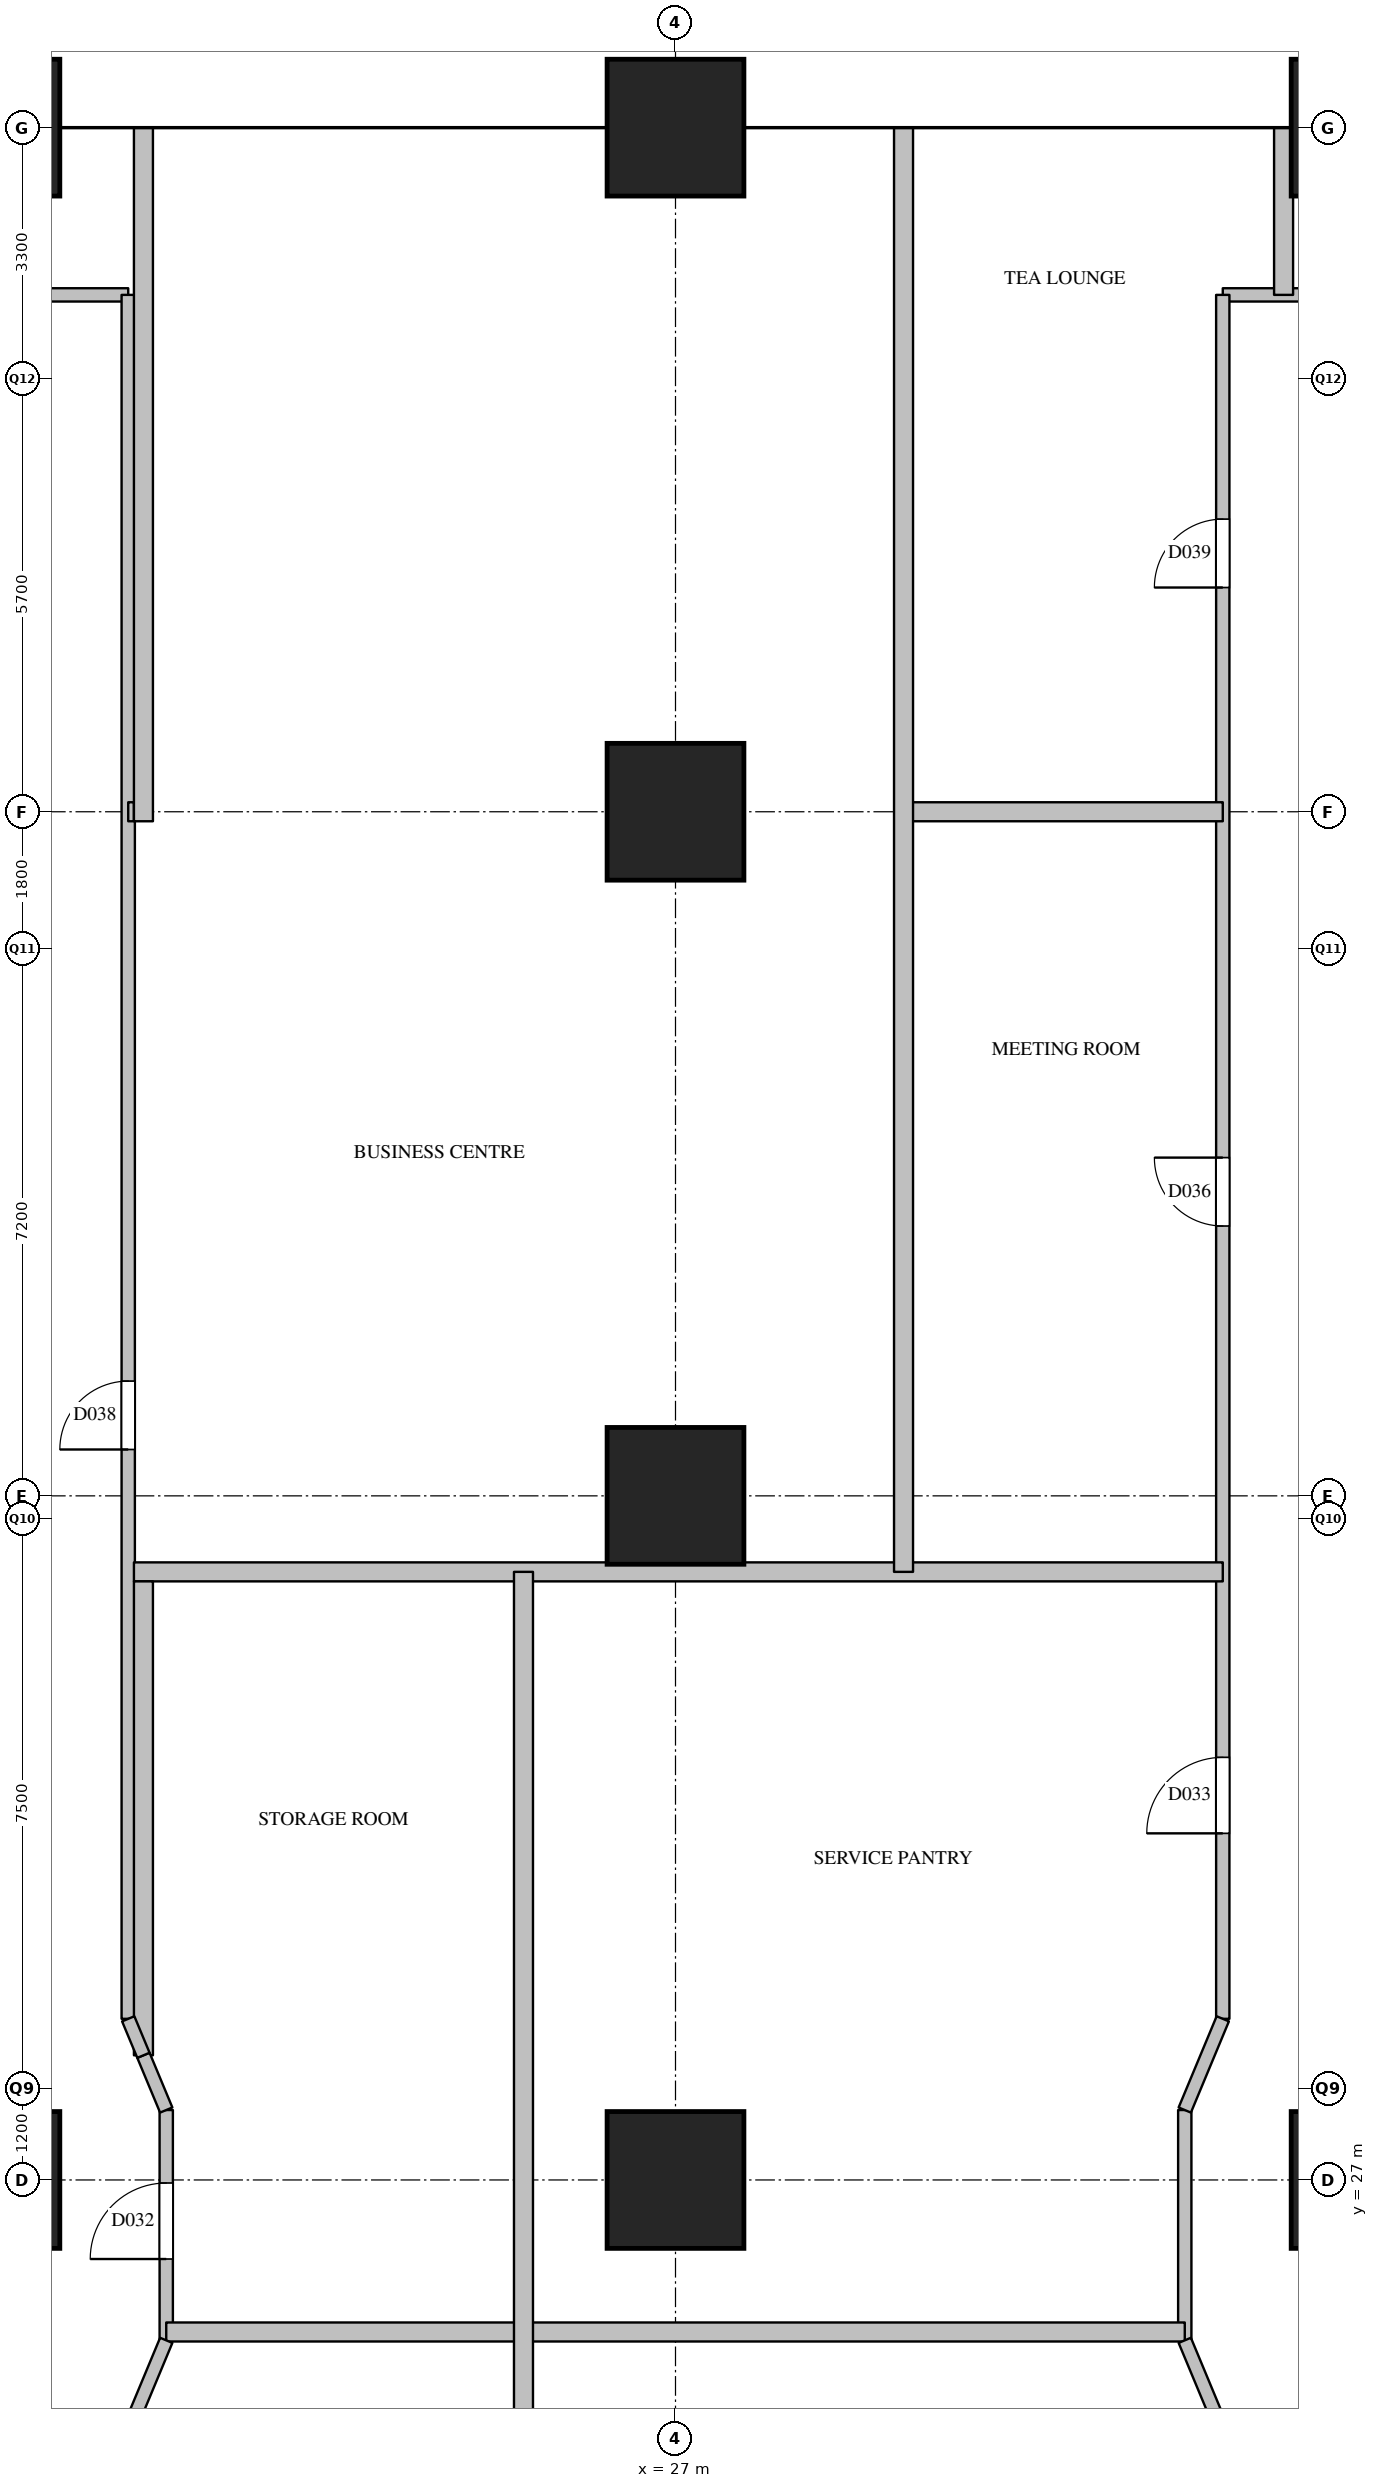
"""IFC4 building model, lengths in metres.
Left out: names, types, materials, properties, quantities, classifications, styles, units other than length and angle.
Written with IfcOpenShell. Run it as: python <this file> out.ifc"""

import sys

from ifc_helpers import new_model, si_unit, direction, frame, frame_2d, origin, origin_2d, place, context, subcontext, project, spatial, rectangle, extrude, element, fill, save


model = new_model("IFC4")
c1 = context("Model", 3, precision=1e-05, world=origin(), true_north=direction((0.0, 1.0)))
c2 = subcontext(c1, "Body", "Model", "MODEL_VIEW")
j1 = project(units=[si_unit("LENGTHUNIT", "METRE"), si_unit("PLANEANGLEUNIT", "RADIAN")], contexts=[c1])
p1 = place(None, origin())
s1 = spatial("IfcSite", under=j1, at=p1, CompositionType="ELEMENT")
p2 = place(p1, origin())
s2 = spatial("IfcBuilding", under=s1, at=p2, CompositionType="ELEMENT")
p3 = place(p2, frame((0.0, 0.0, 72.8)))
s3 = spatial("IfcBuildingStorey", under=s2, at=p3, CompositionType="ELEMENT", Elevation=72.8)
for number, where, z_axis, x_axis in (
    (1, (18.0, 27.0, 0.0), (0.0, 0.0, 1.0), (1.0, 0.0, 0.0)),
    (2, (18.0, 54.0, 0.0), (0.0, 0.0, 1.0), (1.0, 0.0, 0.0)),
    (3, (27.0, 27.0, 0.0), (0.0, 0.0, 1.0), (1.0, 0.0, 0.0)),
    (4, (27.0, 36.0, 0.0), (0.0, 0.0, 1.0), (1.0, 0.0, 0.0)),
    (5, (27.0, 45.0, 0.0), (0.0, 0.0, 1.0), (1.0, 0.0, 0.0)),
    (6, (27.0, 54.0, 0.0), (0.0, 0.0, 1.0), (1.0, 0.0, 0.0)),
    (7, (36.0, 27.0, 0.0), (0.0, 0.0, 1.0), (1.0, 0.0, 0.0)),
    (8, (36.0, 54.0, 0.0), (0.0, 0.0, 1.0), (1.0, 0.0, 0.0)),
):
    element("IfcColumn", number, at=place(p3, frame(where, z_axis=z_axis, x_axis=x_axis)), inside=s3, PredefinedType="COLUMN", context=c2, shape_type="SweptSolid", body=[
        extrude(rectangle(XDim=1.8, YDim=1.8, at=origin_2d()), origin(), (0.0, 0.0, 1.0), 5.0),
    ])
p4 = place(p3, frame((3.8, 51.8, 0.0), z_axis=(0.0, 0.0, 1.0), x_axis=(1.0, 0.0, 0.0)))
e9 = element("IfcWall", 9, at=p4, inside=s3, PredefinedType="PARTITIONING", context=c2, shape_type="SweptSolid", body=[
    extrude(rectangle(XDim=16.0, YDim=0.175, at=frame_2d((8.0, 0.0))), origin(), (0.0, 0.0, 1.0), 4.7),
])
p5 = place(p4, frame((10.65, 0.0, 0.0)))
e10 = element("IfcOpeningElement", 10, at=p5, cuts=e9, PredefinedType="OPENING", context=c2, shape_type="SweptSolid", body=[
    extrude(rectangle(XDim=0.9, YDim=2.1, at=frame_2d((0.45, 1.05))), frame((0.0, 0.097, 0.0), z_axis=(0.0, -1.0, 0.0), x_axis=(1.0, 0.0, 0.0)), (0.0, 0.0, 1.0), 0.195),
])
p6 = place(p3, frame((34.2, 51.8, 0.0), z_axis=(0.0, 0.0, 1.0), x_axis=(1.0, 0.0, 0.0)))
e11 = element("IfcWall", 11, at=p6, inside=s3, PredefinedType="PARTITIONING", context=c2, shape_type="SweptSolid", body=[
    extrude(rectangle(XDim=16.0, YDim=0.175, at=frame_2d((8.0, 0.0))), origin(), (0.0, 0.0, 1.0), 4.7),
])
p7 = place(p6, frame((5.35, 0.0, 0.0)))
e12 = element("IfcOpeningElement", 12, at=p7, cuts=e11, PredefinedType="OPENING", context=c2, shape_type="SweptSolid", body=[
    extrude(rectangle(XDim=0.9, YDim=2.1, at=frame_2d((0.45, 1.05))), frame((0.0, 0.097, 0.0), z_axis=(0.0, -1.0, 0.0), x_axis=(1.0, 0.0, 0.0)), (0.0, 0.0, 1.0), 0.195),
])
p8 = place(p3, frame((19.8, 29.12, 0.0), z_axis=(0.0, 0.0, 1.0), x_axis=(0.0, 1.0, 0.0)))
e13 = element("IfcWall", 13, at=p8, inside=s3, PredefinedType="PARTITIONING", context=c2, shape_type="SweptSolid", body=[
    extrude(rectangle(XDim=22.68, YDim=0.175, at=frame_2d((11.34, 0.0))), origin(), (0.0, 0.0, 1.0), 4.7),
])
p9 = place(p8, frame((7.49, 0.0, 0.0)))
e14 = element("IfcOpeningElement", 14, at=p9, cuts=e13, PredefinedType="OPENING", context=c2, shape_type="SweptSolid", body=[
    extrude(rectangle(XDim=0.9, YDim=2.1, at=frame_2d((0.45, 1.05))), frame((0.0, 0.097, 0.0), z_axis=(0.0, -1.0, 0.0), x_axis=(1.0, 0.0, 0.0)), (0.0, 0.0, 1.0), 0.195),
])
p10 = place(p3, frame((20.3, 24.89, 0.0), z_axis=(0.0, 0.0, 1.0), x_axis=(0.0, 1.0, 0.0)))
e15 = element("IfcWall", 15, at=p10, inside=s3, PredefinedType="PARTITIONING", context=c2, shape_type="SweptSolid", body=[
    extrude(rectangle(XDim=3.03, YDim=0.175, at=frame_2d((1.515, 0.0))), origin(), (0.0, 0.0, 1.0), 3.59),
])
p11 = place(p10, frame((1.07, 0.0, 0.0)))
e16 = element("IfcOpeningElement", 16, at=p11, cuts=e15, PredefinedType="OPENING", context=c2, shape_type="SweptSolid", body=[
    extrude(rectangle(XDim=1.0, YDim=2.1, at=frame_2d((0.5, 1.05))), frame((0.0, 0.097, 0.0), z_axis=(0.0, -1.0, 0.0), x_axis=(1.0, 0.0, 0.0)), (0.0, 0.0, 1.0), 0.195),
])
p12 = place(p3, frame((33.7, 24.89, 0.0), z_axis=(0.0, 0.0, 1.0), x_axis=(0.0, 1.0, 0.0)))
e17 = element("IfcWall", 17, at=p12, inside=s3, PredefinedType="PARTITIONING", context=c2, shape_type="SweptSolid", body=[
    extrude(rectangle(XDim=3.03, YDim=0.175, at=frame_2d((1.515, 0.0))), origin(), (0.0, 0.0, 1.0), 3.7),
])
p13 = place(p3, frame((34.2, 29.12, 0.0), z_axis=(0.0, 0.0, 1.0), x_axis=(0.0, 1.0, 0.0)))
e18 = element("IfcWall", 18, at=p13, inside=s3, PredefinedType="PARTITIONING", context=c2, shape_type="SweptSolid", body=[
    extrude(rectangle(XDim=22.68, YDim=0.175, at=frame_2d((11.34, 0.0))), origin(), (0.0, 0.0, 1.0), 4.7),
])
p14 = place(p13, frame((2.44, 0.0, 0.0)))
e19 = element("IfcOpeningElement", 19, at=p14, cuts=e18, PredefinedType="OPENING", context=c2, shape_type="SweptSolid", body=[
    extrude(rectangle(XDim=1.0, YDim=2.1, at=frame_2d((0.5, 1.05))), frame((0.0, 0.097, 0.0), z_axis=(0.0, -1.0, 0.0), x_axis=(1.0, 0.0, 0.0)), (0.0, 0.0, 1.0), 0.195),
])
p15 = place(p13, frame((10.43, 0.0, 0.0)))
e20 = element("IfcOpeningElement", 20, at=p15, cuts=e18, PredefinedType="OPENING", context=c2, shape_type="SweptSolid", body=[
    extrude(rectangle(XDim=0.9, YDim=2.1, at=frame_2d((0.45, 1.05))), frame((0.0, 0.097, 0.0), z_axis=(0.0, -1.0, 0.0), x_axis=(1.0, 0.0, 0.0)), (0.0, 0.0, 1.0), 0.195),
])
p16 = place(p13, frame((18.83, 0.0, 0.0)))
e21 = element("IfcOpeningElement", 21, at=p16, cuts=e18, PredefinedType="OPENING", context=c2, shape_type="SweptSolid", body=[
    extrude(rectangle(XDim=0.9, YDim=2.1, at=frame_2d((0.45, 1.05))), frame((0.0, 0.097, 0.0), z_axis=(0.0, -1.0, 0.0), x_axis=(1.0, 0.0, 0.0)), (0.0, 0.0, 1.0), 0.195),
])
p17 = place(p3, frame((20.3, 25.0, 0.0), z_axis=(0.0, 0.0, 1.0), x_axis=(1.0, 0.0, 0.0)))
e22 = element("IfcWall", 22, at=p17, inside=s3, PredefinedType="PARTITIONING", context=c2, shape_type="SweptSolid", body=[
    extrude(rectangle(XDim=13.4, YDim=0.25, at=frame_2d((6.7, 0.0))), origin(), (0.0, 0.0, 1.0), 3.59),
])
p18 = place(p3, frame((19.875, 35.0, 0.0), z_axis=(0.0, 0.0, 1.0), x_axis=(1.0, 0.0, 0.0)))
e23 = element("IfcWall", 23, at=p18, inside=s3, PredefinedType="PARTITIONING", context=c2, shape_type="SweptSolid", body=[
    extrude(rectangle(XDim=14.325, YDim=0.25, at=frame_2d((7.163, 0.0))), origin(), (0.0, 0.0, 1.0), 3.7),
])
p19 = place(p3, frame((19.8, 45.0, 0.0), z_axis=(0.0, 0.0, 1.0), x_axis=(1.0, 0.0, 0.0)))
e24 = element("IfcWall", 24, at=p19, inside=s3, PredefinedType="PARTITIONING", context=c2, shape_type="SweptSolid", body=[
    extrude(rectangle(XDim=0.075, YDim=0.25, at=frame_2d((0.038, 0.0))), origin(), (0.0, 0.0, 1.0), 4.7),
])
p20 = place(p3, frame((30.0, 45.0, 0.0), z_axis=(0.0, 0.0, 1.0), x_axis=(1.0, 0.0, 0.0)))
e25 = element("IfcWall", 25, at=p20, inside=s3, PredefinedType="PARTITIONING", context=c2, shape_type="SweptSolid", body=[
    extrude(rectangle(XDim=4.2, YDim=0.25, at=frame_2d((2.1, 0.0))), origin(), (0.0, 0.0, 1.0), 4.7),
])
p21 = place(p3, frame((20.0, 28.64, 0.0), z_axis=(0.0, 0.0, 1.0), x_axis=(0.0, 1.0, 0.0)))
e26 = element("IfcWall", 26, at=p21, inside=s3, PredefinedType="PARTITIONING", context=c2, shape_type="SweptSolid", body=[
    extrude(rectangle(XDim=6.235, YDim=0.25, at=frame_2d((3.118, 0.0))), origin(), (0.0, 0.0, 1.0), 4.7),
])
p22 = place(p3, frame((20.0, 44.875, 0.0), z_axis=(0.0, 0.0, 1.0), x_axis=(0.0, 1.0, 0.0)))
e27 = element("IfcWall", 27, at=p22, inside=s3, PredefinedType="PARTITIONING", context=c2, shape_type="SweptSolid", body=[
    extrude(rectangle(XDim=9.125, YDim=0.25, at=frame_2d((4.562, 0.0))), origin(), (0.0, 0.0, 1.0), 3.7),
])
p23 = place(p3, frame((25.0, 0.0, 0.0), z_axis=(0.0, 0.0, 1.0), x_axis=(0.0, 1.0, 0.0)))
e28 = element("IfcWall", 28, at=p23, inside=s3, PredefinedType="PARTITIONING", context=c2, shape_type="SweptSolid", body=[
    extrude(rectangle(XDim=35.0, YDim=0.25, at=frame_2d((17.5, 0.0))), origin(), (0.0, 0.0, 1.0), 3.59),
])
p24 = place(p3, frame((30.0, 35.0, 0.0), z_axis=(0.0, 0.0, 1.0), x_axis=(0.0, 1.0, 0.0)))
e29 = element("IfcWall", 29, at=p24, inside=s3, PredefinedType="PARTITIONING", context=c2, shape_type="SweptSolid", body=[
    extrude(rectangle(XDim=19.0, YDim=0.25, at=frame_2d((9.5, 0.0))), origin(), (0.0, 0.0, 1.0), 3.7),
])
p25 = place(p3, frame((35.0, 51.8, 0.0), z_axis=(0.0, 0.0, 1.0), x_axis=(0.0, 1.0, 0.0)))
e30 = element("IfcWall", 30, at=p25, inside=s3, PredefinedType="PARTITIONING", context=c2, shape_type="SweptSolid", body=[
    extrude(rectangle(XDim=2.2, YDim=0.25, at=frame_2d((1.1, 0.0))), origin(), (0.0, 0.0, 1.0), 3.7),
])
p26 = place(p3, frame((34.2, 23.69, 0.0), z_axis=(0.0, 0.0, 1.0), x_axis=(-0.384628719983, 0.923071366561, 0.0)))
e31 = element("IfcWall", 31, at=p26, inside=s3, PredefinedType="PARTITIONING", context=c2, shape_type="SweptSolid", body=[
    extrude(rectangle(XDim=1.3, YDim=0.175, at=frame_2d((0.65, 0.0))), origin(), (0.0, 0.0, 1.0), 4.7),
])
p27 = place(p3, frame((33.7, 27.92, 0.0), z_axis=(0.0, 0.0, 1.0), x_axis=(0.384562051588, 0.923099143363, 0.0)))
e32 = element("IfcWall", 32, at=p27, inside=s3, PredefinedType="PARTITIONING", context=c2, shape_type="SweptSolid", body=[
    extrude(rectangle(XDim=1.3, YDim=0.175, at=frame_2d((0.65, 0.0))), origin(), (0.0, 0.0, 1.0), 4.7),
])
p28 = place(p3, frame((20.3, 24.89, 0.0), z_axis=(0.0, 0.0, 1.0), x_axis=(-0.384628719983, -0.923071366561, 0.0)))
e33 = element("IfcWall", 33, at=p28, inside=s3, PredefinedType="PARTITIONING", context=c2, shape_type="SweptSolid", body=[
    extrude(rectangle(XDim=1.3, YDim=0.175, at=frame_2d((0.65, 0.0))), origin(), (0.0, 0.0, 1.0), 4.7),
])
p29 = place(p3, frame((20.0, 28.64, 0.0), z_axis=(0.0, 0.0, 1.0), x_axis=(0.384682059045, -0.923049139238, 0.0)))
e34 = element("IfcWall", 34, at=p29, inside=s3, PredefinedType="PARTITIONING", context=c2, shape_type="SweptSolid", body=[
    extrude(rectangle(XDim=0.78, YDim=0.175, at=frame_2d((0.39, 0.0))), origin(), (0.0, 0.0, 1.0), 4.7),
])
p30 = place(p3, frame((19.8, 29.12, 0.0), z_axis=(0.0, 0.0, 1.0), x_axis=(0.384382095383, -0.92317409233, 0.0)))
e35 = element("IfcWall", 35, at=p30, inside=s3, PredefinedType="PARTITIONING", context=c2, shape_type="SweptSolid", body=[
    extrude(rectangle(XDim=0.52, YDim=0.175, at=frame_2d((0.26, 0.0))), origin(), (0.0, 0.0, 1.0), 4.7),
])
p31 = place(p11, origin())
e36 = element("IfcDoor", 36, at=p31, inside=s3, OperationType="SINGLE_SWING_LEFT", PredefinedType="DOOR", context=c2, shape_type="SweptSolid", body=[
    extrude(rectangle(XDim=1.0, YDim=2.1, at=frame_2d((0.5, 1.05))), frame((0.0, 0.025, 0.0), z_axis=(0.0, -1.0, 0.0), x_axis=(1.0, 0.0, 0.0)), (0.0, 0.0, 1.0), 0.05),
])
fill(e16, e36)
p32 = place(p14, origin())
e37 = element("IfcDoor", 37, at=p32, inside=s3, OperationType="SINGLE_SWING_LEFT", PredefinedType="DOOR", context=c2, shape_type="SweptSolid", body=[
    extrude(rectangle(XDim=1.0, YDim=2.1, at=frame_2d((0.5, 1.05))), frame((0.0, 0.025, 0.0), z_axis=(0.0, -1.0, 0.0), x_axis=(1.0, 0.0, 0.0)), (0.0, 0.0, 1.0), 0.05),
])
fill(e19, e37)
p33 = place(p15, origin())
e38 = element("IfcDoor", 38, at=p33, inside=s3, OperationType="SINGLE_SWING_RIGHT", PredefinedType="DOOR", context=c2, shape_type="SweptSolid", body=[
    extrude(rectangle(XDim=0.9, YDim=2.1, at=frame_2d((0.45, 1.05))), frame((0.0, 0.025, 0.0), z_axis=(0.0, -1.0, 0.0), x_axis=(1.0, 0.0, 0.0)), (0.0, 0.0, 1.0), 0.05),
])
fill(e20, e38)
p34 = place(p9, origin())
e39 = element("IfcDoor", 39, at=p34, inside=s3, OperationType="SINGLE_SWING_LEFT", PredefinedType="DOOR", context=c2, shape_type="SweptSolid", body=[
    extrude(rectangle(XDim=0.9, YDim=2.1, at=frame_2d((0.45, 1.05))), frame((0.0, 0.025, 0.0), z_axis=(0.0, -1.0, 0.0), x_axis=(1.0, 0.0, 0.0)), (0.0, 0.0, 1.0), 0.05),
])
fill(e14, e39)
p35 = place(p16, origin())
e40 = element("IfcDoor", 40, at=p35, inside=s3, OperationType="SINGLE_SWING_LEFT", PredefinedType="DOOR", context=c2, shape_type="SweptSolid", body=[
    extrude(rectangle(XDim=0.9, YDim=2.1, at=frame_2d((0.45, 1.05))), frame((0.0, 0.025, 0.0), z_axis=(0.0, -1.0, 0.0), x_axis=(1.0, 0.0, 0.0)), (0.0, 0.0, 1.0), 0.05),
])
fill(e21, e40)
save(model, sys.argv[1])
